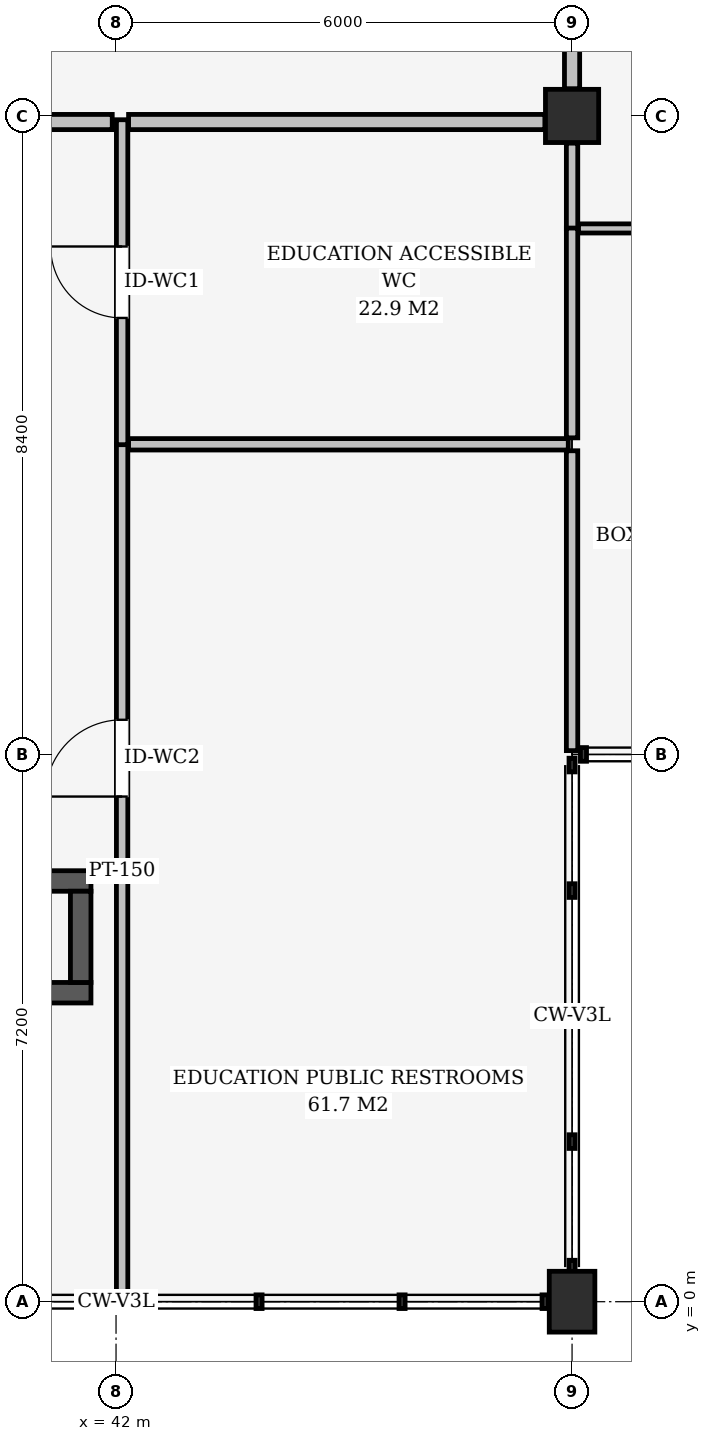
"""IFC4 building model, lengths in metres.
Left out: names, types, materials, properties, quantities, classifications, styles, units other than length and angle.
Written with IfcOpenShell. Run it as: python <this file> out.ifc"""

import sys

from ifc_helpers import new_model, si_unit, direction, frame, frame_2d, origin, origin_2d, place, context, subcontext, project, spatial, rectangle, extrude, element, fill, save


model = new_model("IFC4")
c1 = context("Model", 3, precision=1e-05, world=origin(), true_north=direction((0.0, 1.0)))
c2 = subcontext(c1, "Body", "Model", "MODEL_VIEW")
j1 = project(units=[si_unit("LENGTHUNIT", "METRE"), si_unit("PLANEANGLEUNIT", "RADIAN")], contexts=[c1])
p1 = place(None, origin())
s1 = spatial("IfcSite", under=j1, at=p1, CompositionType="ELEMENT")
p2 = place(p1, origin())
s2 = spatial("IfcBuilding", under=s1, at=p2, CompositionType="ELEMENT")
p3 = place(p2, origin())
s3 = spatial("IfcBuildingStorey", under=s2, at=p3, CompositionType="ELEMENT", Elevation=0.0)
p4 = place(p3, frame((48.0, 0.0, 0.0), z_axis=(0.0, 0.0, 1.0), x_axis=(1.0, 0.0, 0.0)))
e1 = element("IfcColumn", 1, at=p4, inside=s3, PredefinedType="COLUMN", context=c2, shape_type="SweptSolid", body=[
    extrude(rectangle(XDim=0.6, YDim=0.8, at=origin_2d()), origin(), (0.0, 0.0, 1.0), 4.8),
])
p5 = place(p3, frame((48.0, 15.6, 0.0), z_axis=(0.0, 0.0, 1.0), x_axis=(1.0, 0.0, 0.0)))
e2 = element("IfcColumn", 2, at=p5, inside=s3, PredefinedType="COLUMN", context=c2, shape_type="SweptSolid", body=[
    extrude(rectangle(XDim=0.7, YDim=0.7, at=origin_2d()), origin(), (0.0, 0.0, 1.0), 4.8),
])
for number, where, z_axis, x_axis in (
    (3, (39.93, 4.065, 0.0), (0.0, 0.0, 1.0), (1.0, 0.0, 0.0)),
    (4, (39.93, 5.535, 0.0), (0.0, 0.0, 1.0), (1.0, 0.0, 0.0)),
):
    element("IfcWall", number, at=place(p3, frame(where, z_axis=z_axis, x_axis=x_axis)), inside=s3, PredefinedType="SHEAR", context=c2, shape_type="SweptSolid", body=[
        extrude(rectangle(XDim=1.74, YDim=0.27, at=frame_2d((0.87, 0.0))), origin(), (0.0, 0.0, 1.0), 4.55),
    ])
p6 = place(p3, frame((41.535, 4.2, 0.0), z_axis=(0.0, 0.0, 1.0), x_axis=(0.0, 1.0, 0.0)))
e5 = element("IfcWall", 5, at=p6, inside=s3, PredefinedType="SHEAR", context=c2, shape_type="SweptSolid", body=[
    extrude(rectangle(XDim=1.2, YDim=0.27, at=frame_2d((0.6, 0.0))), origin(), (0.0, 0.0, 1.0), 4.55),
])
p7 = place(p3, frame((42.08, 0.05, 0.0), z_axis=(0.0, 0.0, 1.0), x_axis=(0.0, 1.0, 0.0)))
e6 = element("IfcWall", 6, at=p7, inside=s3, PredefinedType="PARTITIONING", context=c2, shape_type="SweptSolid", body=[
    extrude(rectangle(XDim=11.235, YDim=0.15, at=frame_2d((5.617, 0.0))), origin(), (0.0, 0.0, 1.0), 3.986),
])
p8 = place(p7, frame((6.596, 0.0, 0.0)))
e7 = element("IfcOpeningElement", 7, at=p8, cuts=e6, PredefinedType="OPENING", context=c2, shape_type="SweptSolid", body=[
    extrude(rectangle(XDim=1.01, YDim=2.1, at=frame_2d((0.505, 1.05))), frame((0.0, 0.085, 0.0), z_axis=(0.0, -1.0, 0.0), x_axis=(1.0, 0.0, 0.0)), (0.0, 0.0, 1.0), 0.17),
])
p9 = place(p3, frame((42.08, 11.275, 0.0), z_axis=(0.0, 0.0, 1.0), x_axis=(0.0, 1.0, 0.0)))
e8 = element("IfcWall", 8, at=p9, inside=s3, PredefinedType="PARTITIONING", context=c2, shape_type="SweptSolid", body=[
    extrude(rectangle(XDim=4.275, YDim=0.15, at=frame_2d((2.138, 0.0))), origin(), (0.0, 0.0, 1.0), 3.986),
])
p10 = place(p9, frame((1.667, 0.0, 0.0)))
e9 = element("IfcOpeningElement", 9, at=p10, cuts=e8, PredefinedType="OPENING", context=c2, shape_type="SweptSolid", body=[
    extrude(rectangle(XDim=0.94, YDim=2.1, at=frame_2d((0.47, 1.05))), frame((0.0, 0.085, 0.0), z_axis=(0.0, -1.0, 0.0), x_axis=(1.0, 0.0, 0.0)), (0.0, 0.0, 1.0), 0.17),
])
p11 = place(p3, frame((36.358, 15.52, 0.0), z_axis=(0.0, 0.0, 1.0), x_axis=(1.0, 0.0, 0.0)))
e10 = element("IfcWall", 10, at=p11, inside=s3, PredefinedType="PARTITIONING", context=c2, shape_type="SweptSolid", body=[
    extrude(rectangle(XDim=5.592, YDim=0.2, at=frame_2d((2.796, 0.0))), origin(), (0.0, 0.0, 1.0), 3.73),
])
p12 = place(p11, frame((2.341, 0.0, 0.0)))
e11 = element("IfcOpeningElement", 11, at=p12, cuts=e10, PredefinedType="OPENING", context=c2, shape_type="SweptSolid", body=[
    extrude(rectangle(XDim=0.91, YDim=2.1, at=frame_2d((0.455, 1.05))), frame((0.0, 0.11, 0.0), z_axis=(0.0, -1.0, 0.0), x_axis=(1.0, 0.0, 0.0)), (0.0, 0.0, 1.0), 0.22),
])
p13 = place(p3, frame((42.165, 11.28, 0.0), z_axis=(0.0, 0.0, 1.0), x_axis=(1.0, 0.0, 0.0)))
e12 = element("IfcWall", 12, at=p13, inside=s3, PredefinedType="PARTITIONING", context=c2, shape_type="SweptSolid", body=[
    extrude(rectangle(XDim=5.785, YDim=0.15, at=frame_2d((2.893, 0.0))), origin(), (0.0, 0.0, 1.0), 4.53),
])
p14 = place(p3, frame((48.0, 7.25, 0.0), z_axis=(0.0, 0.0, 1.0), x_axis=(0.0, 1.0, 0.0)))
e13 = element("IfcWall", 13, at=p14, inside=s3, PredefinedType="PARTITIONING", context=c2, shape_type="SweptSolid", body=[
    extrude(rectangle(XDim=3.945, YDim=0.15, at=frame_2d((1.973, 0.0))), origin(), (0.0, 0.0, 1.0), 3.684),
])
p15 = place(p3, frame((42.165, 15.52, 0.0), z_axis=(0.0, 0.0, 1.0), x_axis=(1.0, 0.0, 0.0)))
e14 = element("IfcWall", 14, at=p15, inside=s3, PredefinedType="PARTITIONING", context=c2, shape_type="SweptSolid", body=[
    extrude(rectangle(XDim=5.477, YDim=0.2, at=frame_2d((2.739, 0.0))), origin(), (0.0, 0.0, 1.0), 3.73),
])
p16 = place(p3, frame((48.0, 14.115, 0.0), z_axis=(0.0, 0.0, 1.0), x_axis=(0.0, 1.0, 0.0)))
e15 = element("IfcWall", 15, at=p16, inside=s3, PredefinedType="PARTITIONING", context=c2, shape_type="SweptSolid", body=[
    extrude(rectangle(XDim=1.127, YDim=0.15, at=frame_2d((0.563, 0.0))), origin(), (0.0, 0.0, 1.0), 3.684),
])
p17 = place(p3, frame((48.0, 11.365, 0.0), z_axis=(0.0, 0.0, 1.0), x_axis=(0.0, 1.0, 0.0)))
e16 = element("IfcWall", 16, at=p17, inside=s3, PredefinedType="PARTITIONING", context=c2, shape_type="SweptSolid", body=[
    extrude(rectangle(XDim=2.76, YDim=0.15, at=frame_2d((1.38, 0.0))), origin(), (0.0, 0.0, 1.0), 3.684),
])
p18 = place(p3, frame((48.0, 15.958, 0.0), z_axis=(0.0, 0.0, 1.0), x_axis=(0.0, 1.0, 0.0)))
e17 = element("IfcWall", 17, at=p18, inside=s3, PredefinedType="PARTITIONING", context=c2, shape_type="SweptSolid", body=[
    extrude(rectangle(XDim=12.127, YDim=0.2, at=frame_2d((6.063, 0.0))), origin(), (0.0, 0.0, 1.0), 3.919),
])
p19 = place(p18, frame((5.608, 0.0, 0.0)))
e18 = element("IfcOpeningElement", 18, at=p19, cuts=e17, PredefinedType="OPENING", context=c2, shape_type="SweptSolid", body=[
    extrude(rectangle(XDim=0.91, YDim=2.1, at=frame_2d((0.455, 1.05))), frame((0.0, 0.11, 0.0), z_axis=(0.0, -1.0, 0.0), x_axis=(1.0, 0.0, 0.0)), (0.0, 0.0, 1.0), 0.22),
])
p20 = place(p3, frame((48.085, 14.12, 0.0), z_axis=(0.0, 0.0, 1.0), x_axis=(1.0, 0.0, 0.0)))
e19 = element("IfcWall", 19, at=p20, inside=s3, PredefinedType="PARTITIONING", context=c2, shape_type="SweptSolid", body=[
    extrude(rectangle(XDim=9.74, YDim=0.12, at=frame_2d((4.87, 0.0))), origin(), (0.0, 0.0, 1.0), 4.53),
])
p21 = place(p20, frame((4.28, 0.0, 0.0)))
e20 = element("IfcOpeningElement", 20, at=p21, cuts=e19, PredefinedType="OPENING", context=c2, shape_type="SweptSolid", body=[
    extrude(rectangle(XDim=1.18, YDim=2.2, at=frame_2d((0.59, 1.1))), frame((0.0, 0.07, 0.0), z_axis=(0.0, -1.0, 0.0), x_axis=(1.0, 0.0, 0.0)), (0.0, 0.0, 1.0), 0.14),
])
p22 = place(p8, origin())
e21 = element("IfcDoor", 21, at=p22, inside=s3, OperationType="SINGLE_SWING_LEFT", PredefinedType="DOOR", context=c2, shape_type="SweptSolid", body=[
    extrude(rectangle(XDim=1.01, YDim=2.1, at=frame_2d((0.505, 1.05))), frame((0.0, 0.025, 0.0), z_axis=(0.0, -1.0, 0.0), x_axis=(1.0, 0.0, 0.0)), (0.0, 0.0, 1.0), 0.05),
])
fill(e7, e21)
p23 = place(p10, origin())
e22 = element("IfcDoor", 22, at=p23, inside=s3, OperationType="SINGLE_SWING_RIGHT", PredefinedType="DOOR", context=c2, shape_type="SweptSolid", body=[
    extrude(rectangle(XDim=0.94, YDim=2.1, at=frame_2d((0.47, 1.05))), frame((0.0, 0.025, 0.0), z_axis=(0.0, -1.0, 0.0), x_axis=(1.0, 0.0, 0.0)), (0.0, 0.0, 1.0), 0.05),
])
fill(e9, e22)
save(model, sys.argv[1])
